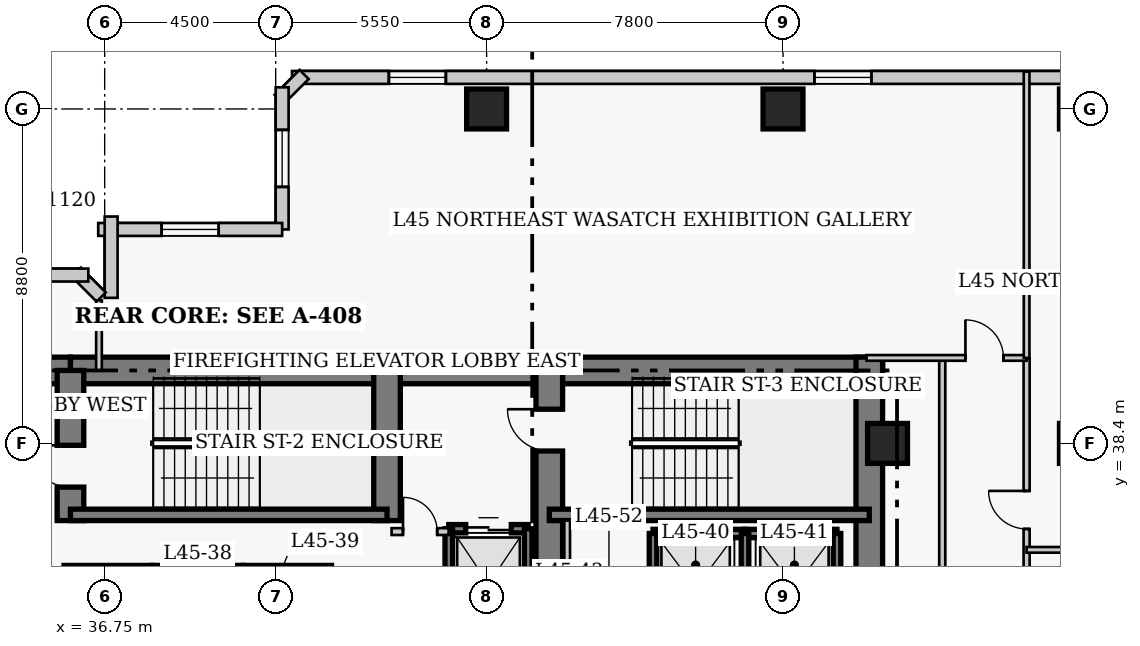
"""IFC4 building model, lengths in metres.
Left out: names, types, materials, properties, quantities, classifications, styles, units other than length and angle.
Written with IfcOpenShell. Run it as: python <this file> out.ifc"""

import sys

from ifc_helpers import new_model, si_unit, direction, frame, frame_2d, origin, origin_2d, place, context, subcontext, project, spatial, rectangle, extrude, element, fill, save


model = new_model("IFC4")
c1 = context("Model", 3, precision=1e-05, world=origin(), true_north=direction((0.0, 1.0)))
c2 = subcontext(c1, "Body", "Model", "MODEL_VIEW")
j1 = project(units=[si_unit("LENGTHUNIT", "METRE"), si_unit("PLANEANGLEUNIT", "RADIAN")], contexts=[c1])
p1 = place(None, origin())
s1 = spatial("IfcSite", under=j1, at=p1, CompositionType="ELEMENT")
p2 = place(p1, origin())
s2 = spatial("IfcBuilding", under=s1, at=p2, CompositionType="ELEMENT")
p3 = place(p2, frame((0.0, 0.0, 180.2)))
s3 = spatial("IfcBuildingStorey", under=s2, at=p3, CompositionType="ELEMENT", Elevation=180.2)
p4 = place(p3, frame((21.55, 40.32, 0.0), z_axis=(0.0, 0.0, 1.0), x_axis=(1.0, 0.0, 0.0)))
e1 = element("IfcWall", 1, at=p4, inside=s3, PredefinedType="SHEAR", context=c2, shape_type="SweptSolid", body=[
    extrude(rectangle(XDim=14.3, YDim=0.7, at=frame_2d((7.15, 0.0))), origin(), (0.0, 0.0, 1.0), 3.8),
])
p5 = place(p3, frame((35.85, 40.32, 0.0), z_axis=(0.0, 0.0, 1.0), x_axis=(1.0, 0.0, 0.0)))
e2 = element("IfcWall", 2, at=p5, inside=s3, PredefinedType="SHEAR", context=c2, shape_type="SweptSolid", body=[
    extrude(rectangle(XDim=12.6, YDim=0.7, at=frame_2d((6.3, 0.0))), origin(), (0.0, 0.0, 1.0), 3.8),
])
p6 = place(p3, frame((48.45, 40.32, 0.0), z_axis=(0.0, 0.0, 1.0), x_axis=(1.0, 0.0, 0.0)))
e3 = element("IfcWall", 3, at=p6, inside=s3, PredefinedType="SHEAR", context=c2, shape_type="SweptSolid", body=[
    extrude(rectangle(XDim=8.77, YDim=0.7, at=frame_2d((4.385, 0.0))), origin(), (0.0, 0.0, 1.0), 3.8),
])
p7 = place(p3, frame((56.87, 27.05, 0.0), z_axis=(0.0, 0.0, 1.0), x_axis=(0.0, 1.0, 0.0)))
e4 = element("IfcWall", 4, at=p7, inside=s3, PredefinedType="SHEAR", context=c2, shape_type="SweptSolid", body=[
    extrude(rectangle(XDim=13.62, YDim=0.7, at=frame_2d((6.81, 0.0))), origin(), (0.0, 0.0, 1.0), 3.8),
])
p8 = place(p3, frame((35.85, 36.37, 0.0), z_axis=(0.0, 0.0, 1.0), x_axis=(0.0, 1.0, 0.0)))
e5 = element("IfcWall", 5, at=p8, inside=s3, PredefinedType="SHEAR", context=c2, shape_type="SweptSolid", body=[
    extrude(rectangle(XDim=3.95, YDim=0.7, at=frame_2d((1.975, 0.0))), origin(), (0.0, 0.0, 1.0), 3.8),
])
p9 = place(p8, frame((0.88, 0.0, 0.0)))
e6 = element("IfcOpeningElement", 6, at=p9, cuts=e5, PredefinedType="OPENING", context=c2, shape_type="SweptSolid", body=[
    extrude(rectangle(XDim=1.1, YDim=2.15, at=frame_2d((0.55, 1.075))), frame((0.0, 0.36, 0.0), z_axis=(0.0, -1.0, 0.0), x_axis=(1.0, 0.0, 0.0)), (0.0, 0.0, 1.0), 0.72),
])
p10 = place(p3, frame((44.18, 36.37, 0.0), z_axis=(0.0, 0.0, 1.0), x_axis=(0.0, 1.0, 0.0)))
e7 = element("IfcWall", 7, at=p10, inside=s3, PredefinedType="SHEAR", context=c2, shape_type="SweptSolid", body=[
    extrude(rectangle(XDim=3.95, YDim=0.7, at=frame_2d((1.975, 0.0))), origin(), (0.0, 0.0, 1.0), 3.8),
])
p11 = place(p3, frame((48.45, 32.4, 0.0), z_axis=(0.0, 0.0, 1.0), x_axis=(0.0, 1.0, 0.0)))
e8 = element("IfcWall", 8, at=p11, inside=s3, PredefinedType="SHEAR", context=c2, shape_type="SweptSolid", body=[
    extrude(rectangle(XDim=7.92, YDim=0.7, at=frame_2d((3.96, 0.0))), origin(), (0.0, 0.0, 1.0), 3.8),
])
p12 = place(p11, frame((5.8, 0.0, 0.0)))
e9 = element("IfcOpeningElement", 9, at=p12, cuts=e8, PredefinedType="OPENING", context=c2, shape_type="SweptSolid", body=[
    extrude(rectangle(XDim=1.1, YDim=2.15, at=frame_2d((0.55, 1.075))), frame((0.0, 0.36, 0.0), z_axis=(0.0, -1.0, 0.0), x_axis=(1.0, 0.0, 0.0)), (0.0, 0.0, 1.0), 0.72),
])
p13 = place(p3, frame((35.85, 36.52, 0.0), z_axis=(0.0, 0.0, 1.0), x_axis=(1.0, 0.0, 0.0)))
e10 = element("IfcWall", 10, at=p13, inside=s3, PredefinedType="SHEAR", context=c2, shape_type="SweptSolid", body=[
    extrude(rectangle(XDim=8.33, YDim=0.3, at=frame_2d((4.165, 0.0))), origin(), (0.0, 0.0, 1.0), 3.8),
])
p14 = place(p3, frame((48.45, 36.52, 0.0), z_axis=(0.0, 0.0, 1.0), x_axis=(1.0, 0.0, 0.0)))
e11 = element("IfcWall", 11, at=p14, inside=s3, PredefinedType="SHEAR", context=c2, shape_type="SweptSolid", body=[
    extrude(rectangle(XDim=8.42, YDim=0.3, at=frame_2d((4.21, 0.0))), origin(), (0.0, 0.0, 1.0), 3.8),
])
for number, where, z_axis, x_axis in (
    (12, (46.8, 47.2, 0.0), (0.0, 0.0, 1.0), (1.0, 0.0, 0.0)),
    (13, (54.6, 47.2, 0.0), (0.0, 0.0, 1.0), (1.0, 0.0, 0.0)),
    (14, (62.4, 38.4, 0.0), (0.0, 0.0, 1.0), (1.0, 0.0, 0.0)),
    (15, (62.4, 47.2, 0.0), (0.0, 0.0, 1.0), (1.0, 0.0, 0.0)),
    (16, (57.35, 38.4, 0.0), (0.0, 0.0, 1.0), (1.0, 0.0, 0.0)),
):
    element("IfcColumn", number, at=place(p3, frame(where, z_axis=z_axis, x_axis=x_axis)), inside=s3, PredefinedType="COLUMN", context=c2, shape_type="SweptSolid", body=[
        extrude(rectangle(XDim=1.05, YDim=1.05, at=origin_2d()), origin(), (0.0, 0.0, 1.0), 3.8),
    ])
p15 = place(p3, frame((68.37, 48.03, 0.0), z_axis=(0.0, 0.0, 1.0), x_axis=(-1.0, 0.0, 0.0)))
e17 = element("IfcWall", 17, at=p15, inside=s3, PredefinedType="SOLIDWALL", context=c2, shape_type="SweptSolid", body=[
    extrude(rectangle(XDim=26.69, YDim=0.34, at=frame_2d((13.345, 0.0))), origin(), (0.0, 0.0, 1.0), 3.42),
])
p16 = place(p15, frame((3.048, 0.0, 0.85)))
e18 = element("IfcOpeningElement", 18, at=p16, cuts=e17, PredefinedType="OPENING", context=c2, shape_type="SweptSolid", body=[
    extrude(rectangle(XDim=1.5, YDim=1.75, at=frame_2d((0.75, 0.875))), frame((0.0, 0.18, 0.0), z_axis=(0.0, -1.0, 0.0), x_axis=(1.0, 0.0, 0.0)), (0.0, 0.0, 1.0), 0.36),
])
p17 = place(p15, frame((11.445, 0.0, 0.85)))
e19 = element("IfcOpeningElement", 19, at=p17, cuts=e17, PredefinedType="OPENING", context=c2, shape_type="SweptSolid", body=[
    extrude(rectangle(XDim=1.5, YDim=1.75, at=frame_2d((0.75, 0.875))), frame((0.0, 0.18, 0.0), z_axis=(0.0, -1.0, 0.0), x_axis=(1.0, 0.0, 0.0)), (0.0, 0.0, 1.0), 0.36),
])
p18 = place(p15, frame((22.642, 0.0, 0.85)))
e20 = element("IfcOpeningElement", 20, at=p18, cuts=e17, PredefinedType="OPENING", context=c2, shape_type="SweptSolid", body=[
    extrude(rectangle(XDim=1.5, YDim=1.75, at=frame_2d((0.75, 0.875))), frame((0.0, 0.18, 0.0), z_axis=(0.0, -1.0, 0.0), x_axis=(1.0, 0.0, 0.0)), (0.0, 0.0, 1.0), 0.36),
])
p19 = place(p3, frame((41.999, 48.108, 0.0), z_axis=(0.0, 0.0, 1.0), x_axis=(-0.707106781187, -0.707106781187, 0.0)))
e21 = element("IfcWall", 21, at=p19, inside=s3, PredefinedType="SOLIDWALL", context=c2, shape_type="SweptSolid", body=[
    extrude(rectangle(XDim=0.929, YDim=0.34, at=frame_2d((0.464, 0.0))), origin(), (0.0, 0.0, 1.0), 3.42),
])
p20 = place(p3, frame((41.42, 47.77, 0.0), z_axis=(0.0, 0.0, 1.0), x_axis=(0.0, -1.0, 0.0)))
e22 = element("IfcWall", 22, at=p20, inside=s3, PredefinedType="SOLIDWALL", context=c2, shape_type="SweptSolid", body=[
    extrude(rectangle(XDim=3.74, YDim=0.34, at=frame_2d((1.87, 0.0))), origin(), (0.0, 0.0, 1.0), 3.42),
])
p21 = place(p20, frame((1.12, 0.0, 0.85)))
e23 = element("IfcOpeningElement", 23, at=p21, cuts=e22, PredefinedType="OPENING", context=c2, shape_type="SweptSolid", body=[
    extrude(rectangle(XDim=1.5, YDim=1.75, at=frame_2d((0.75, 0.875))), frame((0.0, 0.18, 0.0), z_axis=(0.0, -1.0, 0.0), x_axis=(1.0, 0.0, 0.0)), (0.0, 0.0, 1.0), 0.36),
])
p22 = place(p3, frame((41.42, 44.03, 0.0), z_axis=(0.0, 0.0, 1.0), x_axis=(-1.0, 0.0, 0.0)))
e24 = element("IfcWall", 24, at=p22, inside=s3, PredefinedType="SOLIDWALL", context=c2, shape_type="SweptSolid", body=[
    extrude(rectangle(XDim=4.84, YDim=0.34, at=frame_2d((2.42, 0.0))), origin(), (0.0, 0.0, 1.0), 3.42),
])
p23 = place(p22, frame((1.67, 0.0, 0.85)))
e25 = element("IfcOpeningElement", 25, at=p23, cuts=e24, PredefinedType="OPENING", context=c2, shape_type="SweptSolid", body=[
    extrude(rectangle(XDim=1.5, YDim=1.75, at=frame_2d((0.75, 0.875))), frame((0.0, 0.18, 0.0), z_axis=(0.0, -1.0, 0.0), x_axis=(1.0, 0.0, 0.0)), (0.0, 0.0, 1.0), 0.36),
])
p24 = place(p3, frame((36.92, 44.37, 0.0), z_axis=(0.0, 0.0, 1.0), x_axis=(0.0, -1.0, 0.0)))
e26 = element("IfcWall", 26, at=p24, inside=s3, PredefinedType="SOLIDWALL", context=c2, shape_type="SweptSolid", body=[
    extrude(rectangle(XDim=2.14, YDim=0.34, at=frame_2d((1.07, 0.0))), origin(), (0.0, 0.0, 1.0), 3.42),
])
p25 = place(p3, frame((36.658, 42.251, 0.0), z_axis=(0.0, 0.0, 1.0), x_axis=(-0.707106781187, 0.707106781187, 0.0)))
e27 = element("IfcWall", 27, at=p25, inside=s3, PredefinedType="SOLIDWALL", context=c2, shape_type="SweptSolid", body=[
    extrude(rectangle(XDim=0.929, YDim=0.34, at=frame_2d((0.464, 0.0))), origin(), (0.0, 0.0, 1.0), 3.42),
])
p26 = place(p3, frame((36.32, 42.83, 0.0), z_axis=(0.0, 0.0, 1.0), x_axis=(-1.0, 0.0, 0.0)))
e28 = element("IfcWall", 28, at=p26, inside=s3, PredefinedType="SOLIDWALL", context=c2, shape_type="SweptSolid", body=[
    extrude(rectangle(XDim=26.69, YDim=0.34, at=frame_2d((13.345, 0.0))), origin(), (0.0, 0.0, 1.0), 3.42),
])
p27 = place(p26, frame((7.32, 0.0, 0.0)))
e29 = element("IfcOpeningElement", 29, at=p27, cuts=e28, PredefinedType="OPENING", context=c2, shape_type="SweptSolid", body=[
    extrude(rectangle(XDim=1.4, YDim=2.15, at=frame_2d((0.7, 1.075))), frame((0.0, 0.18, 0.0), z_axis=(0.0, -1.0, 0.0), x_axis=(1.0, 0.0, 0.0)), (0.0, 0.0, 1.0), 0.36),
])
p28 = place(p26, frame((2.548, 0.0, 0.85)))
e30 = element("IfcOpeningElement", 30, at=p28, cuts=e28, PredefinedType="OPENING", context=c2, shape_type="SweptSolid", body=[
    extrude(rectangle(XDim=1.5, YDim=1.75, at=frame_2d((0.75, 0.875))), frame((0.0, 0.18, 0.0), z_axis=(0.0, -1.0, 0.0), x_axis=(1.0, 0.0, 0.0)), (0.0, 0.0, 1.0), 0.36),
])
p29 = place(p26, frame((12.595, 0.0, 0.85)))
e31 = element("IfcOpeningElement", 31, at=p29, cuts=e28, PredefinedType="OPENING", context=c2, shape_type="SweptSolid", body=[
    extrude(rectangle(XDim=1.5, YDim=1.75, at=frame_2d((0.75, 0.875))), frame((0.0, 0.18, 0.0), z_axis=(0.0, -1.0, 0.0), x_axis=(1.0, 0.0, 0.0)), (0.0, 0.0, 1.0), 0.36),
])
p30 = place(p26, frame((21.492, 0.0, 0.85)))
e32 = element("IfcOpeningElement", 32, at=p30, cuts=e28, PredefinedType="OPENING", context=c2, shape_type="SweptSolid", body=[
    extrude(rectangle(XDim=1.5, YDim=1.75, at=frame_2d((0.75, 0.875))), frame((0.0, 0.18, 0.0), z_axis=(0.0, -1.0, 0.0), x_axis=(1.0, 0.0, 0.0)), (0.0, 0.0, 1.0), 0.36),
])
p31 = place(p3, frame((35.68, 35.08, 0.0), z_axis=(0.0, 0.0, 1.0), x_axis=(1.0, 0.0, 0.0)))
e33 = element("IfcWall", 33, at=p31, inside=s3, PredefinedType="SHEAR", context=c2, shape_type="SweptSolid", body=[
    extrude(rectangle(XDim=2.32, YDim=0.22, at=frame_2d((1.16, 0.0))), origin(), (0.0, 0.0, 1.0), 3.8),
])
p32 = place(p3, frame((38.0, 35.08, 0.0), z_axis=(0.0, 0.0, 1.0), x_axis=(1.0, 0.0, 0.0)))
e34 = element("IfcWall", 34, at=p32, inside=s3, PredefinedType="SHEAR", context=c2, shape_type="SweptSolid", body=[
    extrude(rectangle(XDim=2.4, YDim=0.22, at=frame_2d((1.2, 0.0))), origin(), (0.0, 0.0, 1.0), 3.8),
])
p33 = place(p3, frame((40.4, 35.08, 0.0), z_axis=(0.0, 0.0, 1.0), x_axis=(1.0, 0.0, 0.0)))
e35 = element("IfcWall", 35, at=p33, inside=s3, PredefinedType="SHEAR", context=c2, shape_type="SweptSolid", body=[
    extrude(rectangle(XDim=2.32, YDim=0.22, at=frame_2d((1.16, 0.0))), origin(), (0.0, 0.0, 1.0), 3.8),
])
p34 = place(p3, frame((51.18, 36.03, 0.0), z_axis=(0.0, 0.0, 1.0), x_axis=(1.0, 0.0, 0.0)))
e36 = element("IfcWall", 36, at=p34, inside=s3, PredefinedType="SHEAR", context=c2, shape_type="SweptSolid", body=[
    extrude(rectangle(XDim=2.42, YDim=0.22, at=frame_2d((1.21, 0.0))), origin(), (0.0, 0.0, 1.0), 3.8),
])
p35 = place(p3, frame((51.18, 33.17, 0.0), z_axis=(0.0, 0.0, 1.0), x_axis=(0.0, 1.0, 0.0)))
e37 = element("IfcWall", 37, at=p35, inside=s3, PredefinedType="SHEAR", context=c2, shape_type="SweptSolid", body=[
    extrude(rectangle(XDim=2.86, YDim=0.2, at=frame_2d((1.43, 0.0))), origin(), (0.0, 0.0, 1.0), 3.8),
])
p36 = place(p3, frame((53.6, 36.03, 0.0), z_axis=(0.0, 0.0, 1.0), x_axis=(1.0, 0.0, 0.0)))
e38 = element("IfcWall", 38, at=p36, inside=s3, PredefinedType="SHEAR", context=c2, shape_type="SweptSolid", body=[
    extrude(rectangle(XDim=2.42, YDim=0.22, at=frame_2d((1.21, 0.0))), origin(), (0.0, 0.0, 1.0), 3.8),
])
for number, where, z_axis, x_axis in (
    (39, (53.6, 33.17, 0.0), (0.0, 0.0, 1.0), (0.0, 1.0, 0.0)),
    (40, (56.02, 33.17, 0.0), (0.0, 0.0, 1.0), (0.0, 1.0, 0.0)),
):
    element("IfcWall", number, at=place(p3, frame(where, z_axis=z_axis, x_axis=x_axis)), inside=s3, PredefinedType="SHEAR", context=c2, shape_type="SweptSolid", body=[
        extrude(rectangle(XDim=2.86, YDim=0.2, at=frame_2d((1.43, 0.0))), origin(), (0.0, 0.0, 1.0), 3.8),
    ])
p37 = place(p3, frame((45.805, 36.155, 0.0), z_axis=(0.0, 0.0, 1.0), x_axis=(1.0, 0.0, 0.0)))
e41 = element("IfcWall", 41, at=p37, inside=s3, PredefinedType="SHEAR", context=c2, shape_type="SweptSolid", body=[
    extrude(rectangle(XDim=2.09, YDim=0.22, at=frame_2d((1.045, 0.0))), origin(), (0.0, 0.0, 1.0), 3.8),
])
p38 = place(p37, frame((0.445, 0.0, 0.0)))
e42 = element("IfcOpeningElement", 42, at=p38, cuts=e41, PredefinedType="OPENING", context=c2, shape_type="SweptSolid", body=[
    extrude(rectangle(XDim=1.2, YDim=2.15, at=frame_2d((0.6, 1.075))), frame((0.0, 0.12, 0.0), z_axis=(0.0, -1.0, 0.0), x_axis=(1.0, 0.0, 0.0)), (0.0, 0.0, 1.0), 0.24),
])
p39 = place(p3, frame((45.805, 32.65, 0.0), z_axis=(0.0, 0.0, 1.0), x_axis=(0.0, 1.0, 0.0)))
e43 = element("IfcWall", 43, at=p39, inside=s3, PredefinedType="SHEAR", context=c2, shape_type="SweptSolid", body=[
    extrude(rectangle(XDim=3.505, YDim=0.2, at=frame_2d((1.752, 0.0))), origin(), (0.0, 0.0, 1.0), 3.8),
])
p40 = place(p3, frame((47.895, 33.245, 0.0), z_axis=(0.0, 0.0, 1.0), x_axis=(0.0, 1.0, 0.0)))
e44 = element("IfcWall", 44, at=p40, inside=s3, PredefinedType="SHEAR", context=c2, shape_type="SweptSolid", body=[
    extrude(rectangle(XDim=2.91, YDim=0.2, at=frame_2d((1.455, 0.0))), origin(), (0.0, 0.0, 1.0), 3.8),
])
p41 = place(p3, frame((44.3, 36.08, 0.0), z_axis=(0.0, 0.0, 1.0), x_axis=(1.0, 0.0, 0.0)))
e45 = element("IfcWall", 45, at=p41, inside=s3, PredefinedType="PARTITIONING", context=c2, shape_type="SweptSolid", body=[
    extrude(rectangle(XDim=1.5, YDim=0.18, at=frame_2d((0.75, 0.0))), origin(), (0.0, 0.0, 1.0), 3.42),
])
p42 = place(p41, frame((0.3, 0.0, 0.0)))
e46 = element("IfcOpeningElement", 46, at=p42, cuts=e45, PredefinedType="OPENING", context=c2, shape_type="SweptSolid", body=[
    extrude(rectangle(XDim=0.9, YDim=2.15, at=frame_2d((0.45, 1.075))), frame((0.0, 0.1, 0.0), z_axis=(0.0, -1.0, 0.0), x_axis=(1.0, 0.0, 0.0)), (0.0, 0.0, 1.0), 0.2),
])
p43 = place(p3, frame((48.92, 32.75, 0.0), z_axis=(0.0, 0.0, 1.0), x_axis=(0.0, 1.0, 0.0)))
e47 = element("IfcWall", 47, at=p43, inside=s3, PredefinedType="PARTITIONING", context=c2, shape_type="SweptSolid", body=[
    extrude(rectangle(XDim=3.62, YDim=0.15, at=frame_2d((1.81, 0.0))), origin(), (0.0, 0.0, 1.0), 3.42),
])
p44 = place(p3, frame((61.01, 12.05, 0.0), z_axis=(0.0, 0.0, 1.0), x_axis=(0.0, 1.0, 0.0)))
e48 = element("IfcWall", 48, at=p44, inside=s3, PredefinedType="PARTITIONING", context=c2, shape_type="SweptSolid", body=[
    extrude(rectangle(XDim=28.6, YDim=0.16, at=frame_2d((14.3, 0.0))), origin(), (0.0, 0.0, 1.0), 3.42),
])
p45 = place(p44, frame((0.925, 0.0, 0.0)))
e49 = element("IfcOpeningElement", 49, at=p45, cuts=e48, PredefinedType="OPENING", context=c2, shape_type="SweptSolid", body=[
    extrude(rectangle(XDim=0.95, YDim=2.1, at=frame_2d((0.475, 1.05))), frame((0.0, 0.09, 0.0), z_axis=(0.0, -1.0, 0.0), x_axis=(1.0, 0.0, 0.0)), (0.0, 0.0, 1.0), 0.18),
])
p46 = place(p44, frame((19.675, 0.0, 0.0)))
e50 = element("IfcOpeningElement", 50, at=p46, cuts=e48, PredefinedType="OPENING", context=c2, shape_type="SweptSolid", body=[
    extrude(rectangle(XDim=0.95, YDim=2.1, at=frame_2d((0.475, 1.05))), frame((0.0, 0.09, 0.0), z_axis=(0.0, -1.0, 0.0), x_axis=(1.0, 0.0, 0.0)), (0.0, 0.0, 1.0), 0.18),
])
p47 = place(p44, frame((24.1, 0.0, 0.0)))
e51 = element("IfcOpeningElement", 51, at=p47, cuts=e48, PredefinedType="OPENING", context=c2, shape_type="SweptSolid", body=[
    extrude(rectangle(XDim=1.0, YDim=2.15, at=frame_2d((0.5, 1.075))), frame((0.0, 0.09, 0.0), z_axis=(0.0, -1.0, 0.0), x_axis=(1.0, 0.0, 0.0)), (0.0, 0.0, 1.0), 0.18),
])
p48 = place(p3, frame((58.79, 19.16, 0.0), z_axis=(0.0, 0.0, 1.0), x_axis=(0.0, 1.0, 0.0)))
e52 = element("IfcWall", 52, at=p48, inside=s3, PredefinedType="PARTITIONING", context=c2, shape_type="SweptSolid", body=[
    extrude(rectangle(XDim=21.49, YDim=0.16, at=frame_2d((10.745, 0.0))), origin(), (0.0, 0.0, 1.0), 3.42),
])
p49 = place(p3, frame((56.8, 40.65, 0.0), z_axis=(0.0, 0.0, 1.0), x_axis=(1.0, 0.0, 0.0)))
e53 = element("IfcWall", 53, at=p49, inside=s3, PredefinedType="PARTITIONING", context=c2, shape_type="SweptSolid", body=[
    extrude(rectangle(XDim=4.21, YDim=0.15, at=frame_2d((2.105, 0.0))), origin(), (0.0, 0.0, 1.0), 3.42),
])
p50 = place(p49, frame((2.6, 0.0, 0.0)))
e54 = element("IfcOpeningElement", 54, at=p50, cuts=e53, PredefinedType="OPENING", context=c2, shape_type="SweptSolid", body=[
    extrude(rectangle(XDim=1.0, YDim=2.15, at=frame_2d((0.5, 1.075))), frame((0.0, 0.085, 0.0), z_axis=(0.0, -1.0, 0.0), x_axis=(1.0, 0.0, 0.0)), (0.0, 0.0, 1.0), 0.17),
])
p51 = place(p3, frame((36.6, 40.32, 0.0), z_axis=(0.0, 0.0, 1.0), x_axis=(0.0, 1.0, 0.0)))
e55 = element("IfcWall", 55, at=p51, inside=s3, PredefinedType="PARTITIONING", context=c2, shape_type="SweptSolid", body=[
    extrude(rectangle(XDim=1.845, YDim=0.15, at=frame_2d((0.922, 0.0))), origin(), (0.0, 0.0, 1.0), 3.42),
])
p52 = place(p3, frame((61.01, 40.65, 0.0), z_axis=(0.0, 0.0, 1.0), x_axis=(0.0, 1.0, 0.0)))
e56 = element("IfcWall", 56, at=p52, inside=s3, PredefinedType="PARTITIONING", context=c2, shape_type="SweptSolid", body=[
    extrude(rectangle(XDim=7.53, YDim=0.15, at=frame_2d((3.765, 0.0))), origin(), (0.0, 0.0, 1.0), 3.42),
])
p53 = place(p3, frame((61.01, 35.6, 0.0), z_axis=(0.0, 0.0, 1.0), x_axis=(1.0, 0.0, 0.0)))
e57 = element("IfcWall", 57, at=p53, inside=s3, PredefinedType="PARTITIONING", context=c2, shape_type="SweptSolid", body=[
    extrude(rectangle(XDim=4.09, YDim=0.15, at=frame_2d((2.045, 0.0))), origin(), (0.0, 0.0, 1.0), 3.42),
])
p54 = place(p17, origin())
e58 = element("IfcWindow", 58, at=p54, inside=s3, PartitioningType="SINGLE_PANEL", PredefinedType="WINDOW", context=c2, shape_type="SweptSolid", body=[
    extrude(rectangle(XDim=1.5, YDim=1.75, at=frame_2d((0.75, 0.875))), frame((0.0, 0.03, 0.0), z_axis=(0.0, -1.0, 0.0), x_axis=(1.0, 0.0, 0.0)), (0.0, 0.0, 1.0), 0.06),
])
fill(e19, e58)
p55 = place(p18, origin())
e59 = element("IfcWindow", 59, at=p55, inside=s3, PartitioningType="SINGLE_PANEL", PredefinedType="WINDOW", context=c2, shape_type="SweptSolid", body=[
    extrude(rectangle(XDim=1.5, YDim=1.75, at=frame_2d((0.75, 0.875))), frame((0.0, 0.03, 0.0), z_axis=(0.0, -1.0, 0.0), x_axis=(1.0, 0.0, 0.0)), (0.0, 0.0, 1.0), 0.06),
])
fill(e20, e59)
p56 = place(p21, origin())
e60 = element("IfcWindow", 60, at=p56, inside=s3, PartitioningType="SINGLE_PANEL", PredefinedType="WINDOW", context=c2, shape_type="SweptSolid", body=[
    extrude(rectangle(XDim=1.5, YDim=1.75, at=frame_2d((0.75, 0.875))), frame((0.0, 0.03, 0.0), z_axis=(0.0, -1.0, 0.0), x_axis=(1.0, 0.0, 0.0)), (0.0, 0.0, 1.0), 0.06),
])
fill(e23, e60)
p57 = place(p23, origin())
e61 = element("IfcWindow", 61, at=p57, inside=s3, PartitioningType="SINGLE_PANEL", PredefinedType="WINDOW", context=c2, shape_type="SweptSolid", body=[
    extrude(rectangle(XDim=1.5, YDim=1.75, at=frame_2d((0.75, 0.875))), frame((0.0, 0.03, 0.0), z_axis=(0.0, -1.0, 0.0), x_axis=(1.0, 0.0, 0.0)), (0.0, 0.0, 1.0), 0.06),
])
fill(e25, e61)
p58 = place(p38, origin())
e62 = element("IfcDoor", 62, at=p58, inside=s3, OperationType="DOUBLE_DOOR_SLIDING", PredefinedType="DOOR", context=c2, shape_type="SweptSolid", body=[
    extrude(rectangle(XDim=1.2, YDim=2.15, at=frame_2d((0.6, 1.075))), frame((0.0, 0.025, 0.0), z_axis=(0.0, -1.0, 0.0), x_axis=(1.0, 0.0, 0.0)), (0.0, 0.0, 1.0), 0.05),
])
fill(e42, e62)
p59 = place(p42, origin())
e63 = element("IfcDoor", 63, at=p59, inside=s3, OperationType="SINGLE_SWING_LEFT", PredefinedType="DOOR", context=c2, shape_type="SweptSolid", body=[
    extrude(rectangle(XDim=0.9, YDim=2.15, at=frame_2d((0.45, 1.075))), frame((0.0, 0.025, 0.0), z_axis=(0.0, -1.0, 0.0), x_axis=(1.0, 0.0, 0.0)), (0.0, 0.0, 1.0), 0.05),
])
fill(e46, e63)
p60 = place(p50, origin())
e64 = element("IfcDoor", 64, at=p60, inside=s3, OperationType="SINGLE_SWING_LEFT", PredefinedType="DOOR", context=c2, shape_type="SweptSolid", body=[
    extrude(rectangle(XDim=1.0, YDim=2.15, at=frame_2d((0.5, 1.075))), frame((0.0, 0.025, 0.0), z_axis=(0.0, -1.0, 0.0), x_axis=(1.0, 0.0, 0.0)), (0.0, 0.0, 1.0), 0.05),
])
fill(e54, e64)
p61 = place(p47, origin())
e65 = element("IfcDoor", 65, at=p61, inside=s3, OperationType="SINGLE_SWING_RIGHT", PredefinedType="DOOR", context=c2, shape_type="SweptSolid", body=[
    extrude(rectangle(XDim=1.0, YDim=2.15, at=frame_2d((0.5, 1.075))), frame((0.0, 0.025, 0.0), z_axis=(0.0, -1.0, 0.0), x_axis=(1.0, 0.0, 0.0)), (0.0, 0.0, 1.0), 0.05),
])
fill(e51, e65)
p62 = place(p9, origin())
e66 = element("IfcDoor", 66, at=p62, inside=s3, OperationType="SINGLE_SWING_RIGHT", PredefinedType="DOOR", context=c2, shape_type="SweptSolid", body=[
    extrude(rectangle(XDim=1.1, YDim=2.15, at=frame_2d((0.55, 1.075))), frame((0.0, 0.025, 0.0), z_axis=(0.0, -1.0, 0.0), x_axis=(1.0, 0.0, 0.0)), (0.0, 0.0, 1.0), 0.05),
])
fill(e6, e66)
p63 = place(p12, origin())
e67 = element("IfcDoor", 67, at=p63, inside=s3, OperationType="SINGLE_SWING_RIGHT", PredefinedType="DOOR", context=c2, shape_type="SweptSolid", body=[
    extrude(rectangle(XDim=1.1, YDim=2.15, at=frame_2d((0.55, 1.075))), frame((0.0, 0.025, 0.0), z_axis=(0.0, -1.0, 0.0), x_axis=(1.0, 0.0, 0.0)), (0.0, 0.0, 1.0), 0.05),
])
fill(e9, e67)
save(model, sys.argv[1])
